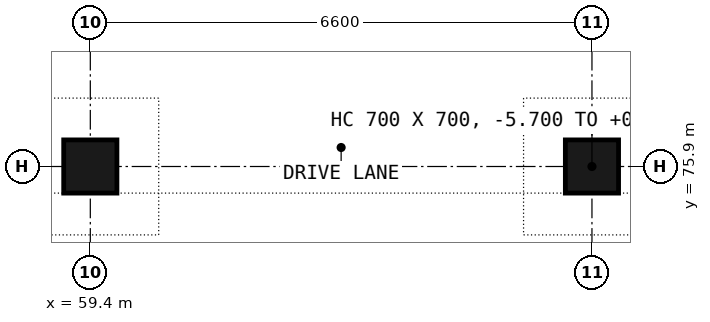
"""IFC4 building model, lengths in metres.
Left out: names, types, materials, properties, quantities, classifications, styles, units other than length and angle.
Written with IfcOpenShell. Run it as: python <this file> out.ifc"""

import sys

from ifc_helpers import new_model, si_unit, direction, frame, origin, origin_2d, place, context, subcontext, project, spatial, rectangle, extrude, element, save


model = new_model("IFC4")
c1 = context("Model", 3, precision=1e-05, world=origin(), true_north=direction((0.0, 1.0)))
c2 = subcontext(c1, "Body", "Model", "MODEL_VIEW")
j1 = project(units=[si_unit("LENGTHUNIT", "METRE"), si_unit("PLANEANGLEUNIT", "RADIAN")], contexts=[c1])
p1 = place(None, origin())
s1 = spatial("IfcSite", under=j1, at=p1, CompositionType="ELEMENT")
p2 = place(p1, origin())
s2 = spatial("IfcBuilding", under=s1, at=p2, CompositionType="ELEMENT")
p3 = place(p2, frame((0.0, 0.0, -5.7)))
s3 = spatial("IfcBuildingStorey", under=s2, at=p3, CompositionType="ELEMENT", Elevation=-5.7)
for number, where, z_axis, x_axis in (
    (1, (59.4, 75.9, 0.0), (0.0, 0.0, 1.0), (1.0, 0.0, 0.0)),
    (2, (66.0, 75.9, 0.0), (0.0, 0.0, 1.0), (1.0, 0.0, 0.0)),
):
    element("IfcColumn", number, at=place(p3, frame(where, z_axis=z_axis, x_axis=x_axis)), inside=s3, PredefinedType="COLUMN", context=c2, shape_type="SweptSolid", body=[
        extrude(rectangle(XDim=0.7, YDim=0.7, at=origin_2d()), origin(), (0.0, 0.0, 1.0), 5.7),
    ])
save(model, sys.argv[1])
